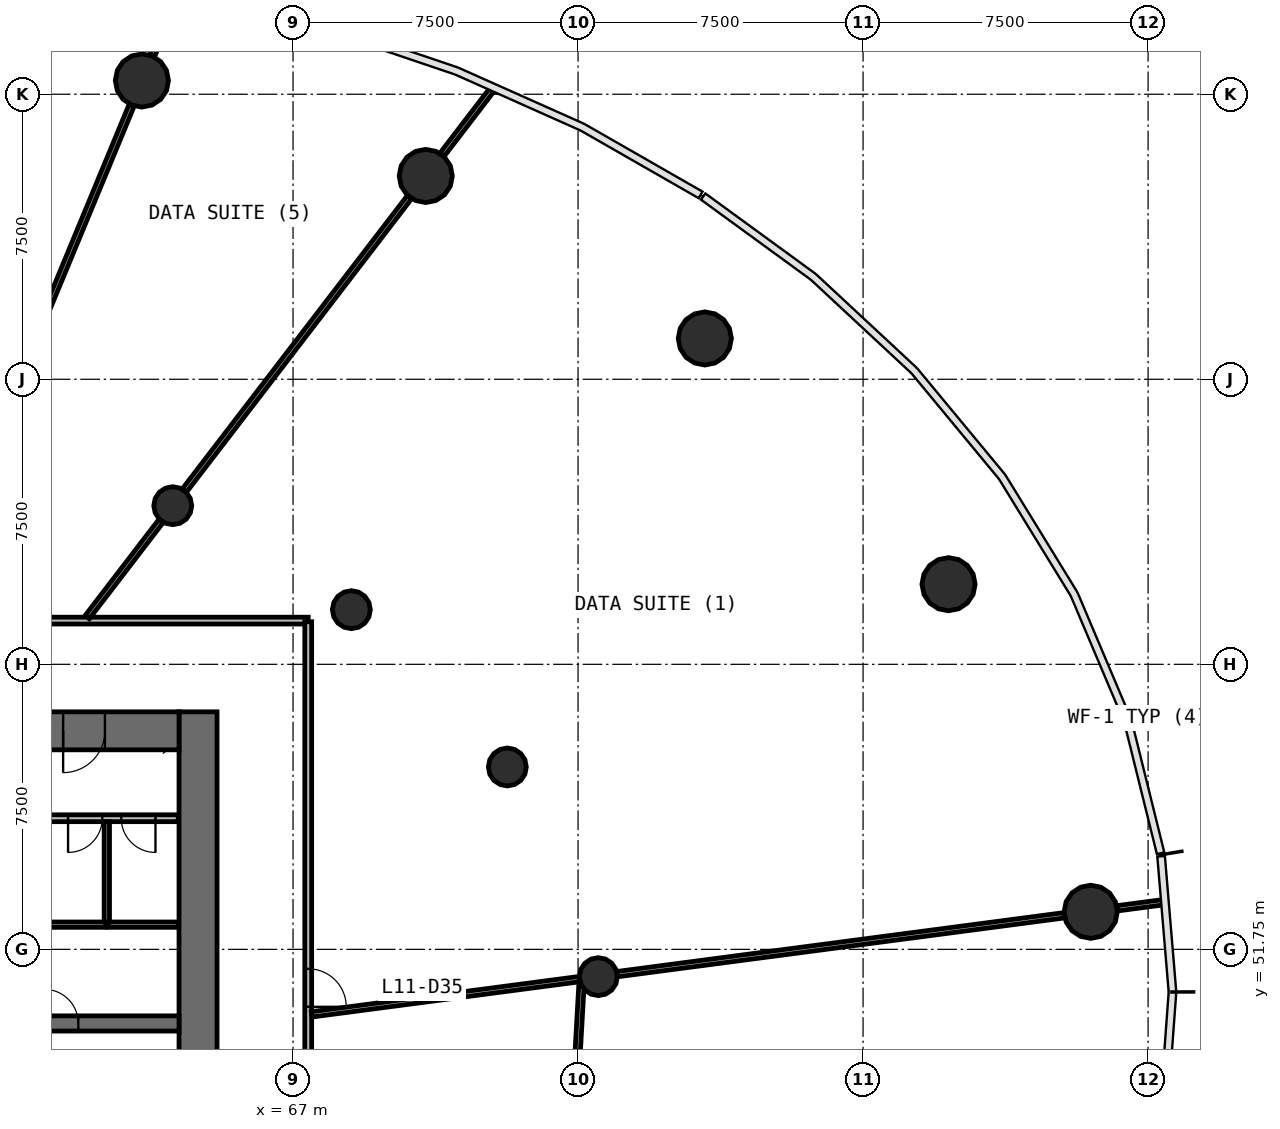
"""IFC4 building model, lengths in metres.
Left out: names, types, materials, properties, quantities, classifications, styles, units other than length and angle.
Written with IfcOpenShell. Run it as: python <this file> out.ifc"""

import sys

from ifc_helpers import new_model, si_unit, direction, frame, frame_2d, origin, origin_2d, place, context, subcontext, project, spatial, rectangle, circle, extrude, source, transform, mapped, element, fill, save


model = new_model("IFC4")
c1 = context("Model", 3, precision=1e-05, world=origin(), true_north=direction((0.0, 1.0)))
c2 = subcontext(c1, "Body", "Model", "MODEL_VIEW")
j1 = project(units=[si_unit("LENGTHUNIT", "METRE"), si_unit("PLANEANGLEUNIT", "RADIAN")], contexts=[c1])
p1 = place(None, origin())
s1 = spatial("IfcSite", under=j1, at=p1, CompositionType="ELEMENT")
p2 = place(p1, origin())
s2 = spatial("IfcBuilding", under=s1, at=p2, CompositionType="ELEMENT")
p3 = place(p2, frame((0.0, 0.0, 49.0)))
s3 = spatial("IfcBuildingStorey", under=s2, at=p3, CompositionType="ELEMENT", Elevation=49.0)
p4 = place(p3, frame((64.5, 38.0, 0.0), z_axis=(0.0, 0.0, 1.0), x_axis=(0.0, 1.0, 0.0)))
e1 = element("IfcWall", 1, at=p4, inside=s3, PredefinedType="SHEAR", context=c2, shape_type="SweptSolid", body=[
    extrude(rectangle(XDim=20.0, YDim=1.0, at=frame_2d((10.0, 0.0))), origin(), (0.0, 0.0, 1.0), 4.4),
])
p5 = place(p4, frame((9.1, 0.0, 0.0)))
e2 = element("IfcOpeningElement", 2, at=p5, cuts=e1, PredefinedType="OPENING", context=c2, shape_type="SweptSolid", body=[
    extrude(rectangle(XDim=1.8, YDim=2.1, at=frame_2d((0.9, 1.05))), frame((0.0, 0.51, 0.0), z_axis=(0.0, -1.0, 0.0), x_axis=(1.0, 0.0, 0.0)), (0.0, 0.0, 1.0), 1.02),
])
p6 = place(p3, frame((64.0, 57.5, 0.0), z_axis=(0.0, 0.0, 1.0), x_axis=(-1.0, 0.0, 0.0)))
e3 = element("IfcWall", 3, at=p6, inside=s3, PredefinedType="SHEAR", context=c2, shape_type="SweptSolid", body=[
    extrude(rectangle(XDim=24.0, YDim=1.0, at=frame_2d((12.0, 0.0))), origin(), (0.0, 0.0, 1.0), 4.4),
])
p7 = place(p6, frame((21.45, 0.0, 0.0)))
e4 = element("IfcOpeningElement", 4, at=p7, cuts=e3, PredefinedType="OPENING", context=c2, shape_type="SweptSolid", body=[
    extrude(rectangle(XDim=1.1, YDim=2.1, at=frame_2d((0.55, 1.05))), frame((0.0, 0.51, 0.0), z_axis=(0.0, -1.0, 0.0), x_axis=(1.0, 0.0, 0.0)), (0.0, 0.0, 1.0), 1.02),
])
p8 = place(p6, frame((1.95, 0.0, 0.0)))
e5 = element("IfcOpeningElement", 5, at=p8, cuts=e3, PredefinedType="OPENING", context=c2, shape_type="SweptSolid", body=[
    extrude(rectangle(XDim=1.1, YDim=2.1, at=frame_2d((0.55, 1.05))), frame((0.0, 0.51, 0.0), z_axis=(0.0, -1.0, 0.0), x_axis=(1.0, 0.0, 0.0)), (0.0, 0.0, 1.0), 1.02),
])
p9 = place(p3, frame((40.0, 49.8, 0.0), z_axis=(0.0, 0.0, 1.0), x_axis=(1.0, 0.0, 0.0)))
e6 = element("IfcWall", 6, at=p9, inside=s3, PredefinedType="SHEAR", context=c2, shape_type="SweptSolid", body=[
    extrude(rectangle(XDim=24.0, YDim=0.4, at=frame_2d((12.0, 0.0))), origin(), (0.0, 0.0, 1.0), 4.4),
])
p10 = place(p9, frame((4.5, 0.0, 0.0)))
e7 = element("IfcOpeningElement", 7, at=p10, cuts=e6, PredefinedType="OPENING", context=c2, shape_type="SweptSolid", body=[
    extrude(rectangle(XDim=1.1, YDim=2.1, at=frame_2d((0.55, 1.05))), frame((0.0, 0.21, 0.0), z_axis=(0.0, -1.0, 0.0), x_axis=(1.0, 0.0, 0.0)), (0.0, 0.0, 1.0), 0.42),
])
p11 = place(p9, frame((7.0, 0.0, 0.0)))
e8 = element("IfcOpeningElement", 8, at=p11, cuts=e6, PredefinedType="OPENING", context=c2, shape_type="SweptSolid", body=[
    extrude(rectangle(XDim=1.1, YDim=2.1, at=frame_2d((0.55, 1.05))), frame((0.0, 0.21, 0.0), z_axis=(0.0, -1.0, 0.0), x_axis=(1.0, 0.0, 0.0)), (0.0, 0.0, 1.0), 0.42),
])
p12 = place(p9, frame((9.5, 0.0, 0.0)))
e9 = element("IfcOpeningElement", 9, at=p12, cuts=e6, PredefinedType="OPENING", context=c2, shape_type="SweptSolid", body=[
    extrude(rectangle(XDim=1.1, YDim=2.1, at=frame_2d((0.55, 1.05))), frame((0.0, 0.21, 0.0), z_axis=(0.0, -1.0, 0.0), x_axis=(1.0, 0.0, 0.0)), (0.0, 0.0, 1.0), 0.42),
])
p13 = place(p9, frame((0.9, 0.0, 0.0)))
e10 = element("IfcOpeningElement", 10, at=p13, cuts=e6, PredefinedType="OPENING", context=c2, shape_type="SweptSolid", body=[
    extrude(rectangle(XDim=1.8, YDim=2.4, at=frame_2d((0.9, 1.2))), frame((0.0, 0.21, 0.0), z_axis=(0.0, -1.0, 0.0), x_axis=(1.0, 0.0, 0.0)), (0.0, 0.0, 1.0), 0.42),
])
p14 = place(p9, frame((20.45, 0.0, 0.0)))
e11 = element("IfcOpeningElement", 11, at=p14, cuts=e6, PredefinedType="OPENING", context=c2, shape_type="SweptSolid", body=[
    extrude(rectangle(XDim=0.9, YDim=2.1, at=frame_2d((0.45, 1.05))), frame((0.0, 0.21, 0.0), z_axis=(0.0, -1.0, 0.0), x_axis=(1.0, 0.0, 0.0)), (0.0, 0.0, 1.0), 0.42),
])
p15 = place(p9, frame((11.65, 0.0, 0.0)))
e12 = element("IfcOpeningElement", 12, at=p15, cuts=e6, PredefinedType="OPENING", context=c2, shape_type="SweptSolid", body=[
    extrude(rectangle(XDim=0.9, YDim=2.1, at=frame_2d((0.45, 1.05))), frame((0.0, 0.21, 0.0), z_axis=(0.0, -1.0, 0.0), x_axis=(1.0, 0.0, 0.0)), (0.0, 0.0, 1.0), 0.42),
])
m1 = source(origin(), c2, "Body", "SweptSolid", [
    extrude(circle(Radius=0.7, at=origin_2d()), origin(), (0.0, 0.0, 1.0), 4.4),
])
for number, where, z_axis, x_axis in (
    (13, (87.99, 52.738, 0.0), (0.0, 0.0, 1.0), (1.0, 0.0, 0.0)),
    (14, (84.249, 61.358, 0.0), (0.0, 0.0, 1.0), (1.0, 0.0, 0.0)),
    (15, (77.836, 67.824, 0.0), (0.0, 0.0, 1.0), (1.0, 0.0, 0.0)),
    (16, (70.492, 72.1, 0.0), (0.0, 0.0, 1.0), (1.0, 0.0, 0.0)),
    (17, (63.023, 74.611, 0.0), (0.0, 0.0, 1.0), (1.0, 0.0, 0.0)),
):
    element("IfcColumn", number, at=place(p3, frame(where, z_axis=z_axis, x_axis=x_axis)), inside=s3, PredefinedType="COLUMN", context=c2, shape_type="MappedRepresentation", body=[
        mapped(m1, transform((0.0, 0.0, 0.0), scale=1.0)),
    ])
m2 = source(origin(), c2, "Body", "SweptSolid", [
    extrude(circle(Radius=0.5, at=origin_2d()), origin(), (0.0, 0.0, 1.0), 4.4),
])
for number, where, z_axis, x_axis in (
    (18, (75.034, 51.032, 0.0), (0.0, 0.0, 1.0), (1.0, 0.0, 0.0)),
    (19, (72.639, 56.549, 0.0), (0.0, 0.0, 1.0), (1.0, 0.0, 0.0)),
    (20, (68.535, 60.688, 0.0), (0.0, 0.0, 1.0), (1.0, 0.0, 0.0)),
    (21, (63.835, 63.424, 0.0), (0.0, 0.0, 1.0), (1.0, 0.0, 0.0)),
):
    element("IfcColumn", number, at=place(p3, frame(where, z_axis=z_axis, x_axis=x_axis)), inside=s3, PredefinedType="COLUMN", context=c2, shape_type="MappedRepresentation", body=[
        mapped(m2, transform((0.0, 0.0, 0.0), scale=1.0)),
    ])
p16 = place(p3, frame((36.6, 60.4, 0.0), z_axis=(0.0, 0.0, 1.0), x_axis=(1.0, 0.0, 0.0)))
e22 = element("IfcWall", 22, at=p16, inside=s3, PredefinedType="PARTITIONING", context=c2, shape_type="SweptSolid", body=[
    extrude(rectangle(XDim=30.8, YDim=0.18, at=frame_2d((15.4, 0.0))), origin(), (0.0, 0.0, 1.0), 3.05),
])
p17 = place(p16, frame((20.95, 0.0, 0.0)))
e23 = element("IfcOpeningElement", 23, at=p17, cuts=e22, PredefinedType="OPENING", context=c2, shape_type="SweptSolid", body=[
    extrude(rectangle(XDim=1.0, YDim=2.1, at=frame_2d((0.5, 1.05))), frame((0.0, 0.1, 0.0), z_axis=(0.0, -1.0, 0.0), x_axis=(1.0, 0.0, 0.0)), (0.0, 0.0, 1.0), 0.2),
])
p18 = place(p16, frame((17.35, 0.0, 0.0)))
e24 = element("IfcOpeningElement", 24, at=p18, cuts=e22, PredefinedType="OPENING", context=c2, shape_type="SweptSolid", body=[
    extrude(rectangle(XDim=1.0, YDim=2.1, at=frame_2d((0.5, 1.05))), frame((0.0, 0.1, 0.0), z_axis=(0.0, -1.0, 0.0), x_axis=(1.0, 0.0, 0.0)), (0.0, 0.0, 1.0), 0.2),
])
p19 = place(p16, frame((14.95, 0.0, 0.0)))
e25 = element("IfcOpeningElement", 25, at=p19, cuts=e22, PredefinedType="OPENING", context=c2, shape_type="SweptSolid", body=[
    extrude(rectangle(XDim=1.0, YDim=2.1, at=frame_2d((0.5, 1.05))), frame((0.0, 0.1, 0.0), z_axis=(0.0, -1.0, 0.0), x_axis=(1.0, 0.0, 0.0)), (0.0, 0.0, 1.0), 0.2),
])
p20 = place(p3, frame((67.4, 60.37, 0.0), z_axis=(0.0, 0.0, 1.0), x_axis=(0.0, -1.0, 0.0)))
e26 = element("IfcWall", 26, at=p20, inside=s3, PredefinedType="PARTITIONING", context=c2, shape_type="SweptSolid", body=[
    extrude(rectangle(XDim=23.583, YDim=0.18, at=frame_2d((11.791, 0.0))), origin(), (0.0, 0.0, 1.0), 3.05),
])
p21 = place(p20, frame((11.333, 0.0, 0.0)))
e27 = element("IfcOpeningElement", 27, at=p21, cuts=e26, PredefinedType="OPENING", context=c2, shape_type="SweptSolid", body=[
    extrude(rectangle(XDim=1.0, YDim=2.1, at=frame_2d((0.5, 1.05))), frame((0.0, 0.1, 0.0), z_axis=(0.0, -1.0, 0.0), x_axis=(1.0, 0.0, 0.0)), (0.0, 0.0, 1.0), 0.2),
])
p22 = place(p20, frame((9.133, 0.0, 0.0)))
e28 = element("IfcOpeningElement", 28, at=p22, cuts=e26, PredefinedType="OPENING", context=c2, shape_type="SweptSolid", body=[
    extrude(rectangle(XDim=1.0, YDim=2.1, at=frame_2d((0.5, 1.05))), frame((0.0, 0.1, 0.0), z_axis=(0.0, -1.0, 0.0), x_axis=(1.0, 0.0, 0.0)), (0.0, 0.0, 1.0), 0.2),
])
p23 = place(p3, frame((63.98, 55.2, 0.0), z_axis=(0.0, 0.0, 1.0), x_axis=(-1.0, 0.0, 0.0)))
e29 = element("IfcWall", 29, at=p23, inside=s3, PredefinedType="PARTITIONING", context=c2, shape_type="SweptSolid", body=[
    extrude(rectangle(XDim=3.75, YDim=0.18, at=frame_2d((1.875, 0.0))), origin(), (0.0, 0.0, 1.0), 3.95),
])
p24 = place(p23, frame((2.0, 0.0, 0.0)))
e30 = element("IfcOpeningElement", 30, at=p24, cuts=e29, PredefinedType="OPENING", context=c2, shape_type="SweptSolid", body=[
    extrude(rectangle(XDim=0.9, YDim=2.1, at=frame_2d((0.45, 1.05))), frame((0.0, 0.1, 0.0), z_axis=(0.0, -1.0, 0.0), x_axis=(1.0, 0.0, 0.0)), (0.0, 0.0, 1.0), 0.2),
])
p25 = place(p23, frame((0.6, 0.0, 0.0)))
e31 = element("IfcOpeningElement", 31, at=p25, cuts=e29, PredefinedType="OPENING", context=c2, shape_type="SweptSolid", body=[
    extrude(rectangle(XDim=0.9, YDim=2.1, at=frame_2d((0.45, 1.05))), frame((0.0, 0.1, 0.0), z_axis=(0.0, -1.0, 0.0), x_axis=(1.0, 0.0, 0.0)), (0.0, 0.0, 1.0), 0.2),
])
p26 = place(p3, frame((75.534, 51.098, 0.0), z_axis=(0.0, 0.0, 1.0), x_axis=(0.991446586451, 0.130513088287, 0.0)))
e32 = element("IfcWall", 32, at=p26, inside=s3, PredefinedType="PARTITIONING", context=c2, shape_type="SweptSolid", body=[
    extrude(rectangle(XDim=11.86, YDim=0.14, at=frame_2d((5.93, 0.0))), origin(), (0.0, 0.0, 1.0), 3.05),
])
p27 = place(p3, frame((64.142, 63.824, 0.0), z_axis=(0.0, 0.0, 1.0), x_axis=(0.608770295053, 0.793346537057, 0.0)))
e33 = element("IfcWall", 33, at=p27, inside=s3, PredefinedType="PARTITIONING", context=c2, shape_type="SweptSolid", body=[
    extrude(rectangle(XDim=9.727, YDim=0.14, at=frame_2d((4.864, 0.0))), origin(), (0.0, 0.0, 1.0), 3.05),
])
p28 = place(p3, frame((59.248, 65.498, 0.0), z_axis=(0.0, 0.0, 1.0), x_axis=(0.382672728165, 0.923883966264, 0.0)))
e34 = element("IfcWall", 34, at=p28, inside=s3, PredefinedType="PARTITIONING", context=c2, shape_type="SweptSolid", body=[
    extrude(rectangle(XDim=9.16, YDim=0.14, at=frame_2d((4.58, 0.0))), origin(), (0.0, 0.0, 1.0), 3.05),
])
p29 = place(p3, frame((67.49, 50.039, 0.0), z_axis=(0.0, 0.0, 1.0), x_axis=(0.99144622305, 0.130515848849, 0.0)))
e35 = element("IfcWall", 35, at=p29, inside=s3, PredefinedType="PARTITIONING", context=c2, shape_type="SweptSolid", body=[
    extrude(rectangle(XDim=7.104, YDim=0.14, at=frame_2d((3.552, 0.0))), origin(), (0.0, 0.0, 1.0), 3.05),
])
p30 = place(p3, frame((74.589, 50.793, 0.0), z_axis=(0.0, 0.0, 1.0), x_axis=(-0.056551571082, -0.998399679391, 0.0)))
e36 = element("IfcWall", 36, at=p30, inside=s3, PredefinedType="PARTITIONING", context=c2, shape_type="SweptSolid", body=[
    extrude(rectangle(XDim=5.401, YDim=0.14, at=frame_2d((2.7, 0.0))), origin(), (0.0, 0.0, 1.0), 3.05),
])
p31 = place(p30, frame((2.151, 0.0, 0.0)))
e37 = element("IfcOpeningElement", 37, at=p31, cuts=e36, PredefinedType="OPENING", context=c2, shape_type="SweptSolid", body=[
    extrude(rectangle(XDim=1.0, YDim=2.1, at=frame_2d((0.5, 1.05))), frame((0.0, 0.08, 0.0), z_axis=(0.0, -1.0, 0.0), x_axis=(1.0, 0.0, 0.0)), (0.0, 0.0, 1.0), 0.16),
])
p32 = place(p3, frame((61.584, 60.49, 0.0), z_axis=(0.0, 0.0, 1.0), x_axis=(0.60874605662, 0.793365135703, 0.0)))
e38 = element("IfcWall", 38, at=p32, inside=s3, PredefinedType="PARTITIONING", context=c2, shape_type="SweptSolid", body=[
    extrude(rectangle(XDim=3.194, YDim=0.14, at=frame_2d((1.597, 0.0))), origin(), (0.0, 0.0, 1.0), 3.05),
])
p33 = place(p3, frame((62.1, 52.4, 0.0), z_axis=(0.0, 0.0, 1.0), x_axis=(0.0, 1.0, 0.0)))
e39 = element("IfcWall", 39, at=p33, inside=s3, PredefinedType="PARTITIONING", context=c2, shape_type="SweptSolid", body=[
    extrude(rectangle(XDim=2.71, YDim=0.14, at=frame_2d((1.355, 0.0))), origin(), (0.0, 0.0, 1.0), 3.05),
])
p34 = place(p3, frame((70.921, 72.658, 0.0), z_axis=(0.0, 0.0, 1.0), x_axis=(0.608822106268, 0.793306777306, 0.0)))
e40 = element("IfcWall", 40, at=p34, inside=s3, PredefinedType="PARTITIONING", context=c2, shape_type="SweptSolid", body=[
    extrude(rectangle(XDim=2.152, YDim=0.14, at=frame_2d((1.076, 0.0))), origin(), (0.0, 0.0, 1.0), 3.05),
])
p35 = place(p3, frame((62.07, 52.4, 0.0), z_axis=(0.0, 0.0, 1.0), x_axis=(-1.0, 0.0, 0.0)))
e41 = element("IfcWall", 41, at=p35, inside=s3, PredefinedType="PARTITIONING", context=c2, shape_type="SweptSolid", body=[
    extrude(rectangle(XDim=1.84, YDim=0.14, at=frame_2d((0.92, 0.0))), origin(), (0.0, 0.0, 1.0), 3.05),
])
p36 = place(p3, frame((63.98, 52.4, 0.0), z_axis=(0.0, 0.0, 1.0), x_axis=(-1.0, 0.0, 0.0)))
e42 = element("IfcWall", 42, at=p36, inside=s3, PredefinedType="PARTITIONING", context=c2, shape_type="SweptSolid", body=[
    extrude(rectangle(XDim=1.85, YDim=0.14, at=frame_2d((0.925, 0.0))), origin(), (0.0, 0.0, 1.0), 3.05),
])
p37 = place(p3, frame((63.292, 75.263, 0.0), z_axis=(0.0, 0.0, 1.0), x_axis=(0.382632674553, 0.923900555452, 0.0)))
e43 = element("IfcWall", 43, at=p37, inside=s3, PredefinedType="PARTITIONING", context=c2, shape_type="SweptSolid", body=[
    extrude(rectangle(XDim=1.714, YDim=0.14, at=frame_2d((0.857, 0.0))), origin(), (0.0, 0.0, 1.0), 3.05),
])
p38 = place(p3, frame((88.689, 52.83, 0.0), z_axis=(0.0, 0.0, 1.0), x_axis=(0.991424298155, 0.130682290411, 0.0)))
e44 = element("IfcWall", 44, at=p38, inside=s3, PredefinedType="PARTITIONING", context=c2, shape_type="SweptSolid", body=[
    extrude(rectangle(XDim=1.22, YDim=0.14, at=frame_2d((0.61, 0.0))), origin(), (0.0, 0.0, 1.0), 3.05),
])
m3 = source(origin(), c2, "Body", "SweptSolid", [
    extrude(rectangle(XDim=1.1, YDim=2.1, at=frame_2d((0.55, 1.05))), frame((0.0, 0.025, 0.0), z_axis=(0.0, -1.0, 0.0), x_axis=(1.0, 0.0, 0.0)), (0.0, 0.0, 1.0), 0.05),
])
p39 = place(p8, origin())
e45 = element("IfcDoor", 45, at=p39, inside=s3, OperationType="SINGLE_SWING_RIGHT", PredefinedType="DOOR", context=c2, shape_type="MappedRepresentation", body=[
    mapped(m3, transform((0.0, 0.0, 0.0), scale=1.0)),
])
fill(e5, e45)
m4 = source(origin(), c2, "Body", "SweptSolid", [
    extrude(rectangle(XDim=1.0, YDim=2.1, at=frame_2d((0.5, 1.05))), frame((0.0, 0.025, 0.0), z_axis=(0.0, -1.0, 0.0), x_axis=(1.0, 0.0, 0.0)), (0.0, 0.0, 1.0), 0.05),
])
p40 = place(p22, origin())
e46 = element("IfcDoor", 46, at=p40, inside=s3, OperationType="SINGLE_SWING_RIGHT", PredefinedType="DOOR", context=c2, shape_type="MappedRepresentation", body=[
    mapped(m4, transform((0.0, 0.0, 0.0), scale=1.0)),
])
fill(e28, e46)
m5 = source(origin(), c2, "Body", "SweptSolid", [
    extrude(rectangle(XDim=0.9, YDim=2.1, at=frame_2d((0.45, 1.05))), frame((0.0, 0.025, 0.0), z_axis=(0.0, -1.0, 0.0), x_axis=(1.0, 0.0, 0.0)), (0.0, 0.0, 1.0), 0.05),
])
p41 = place(p14, origin())
e47 = element("IfcDoor", 47, at=p41, inside=s3, OperationType="SINGLE_SWING_LEFT", PredefinedType="DOOR", context=c2, shape_type="MappedRepresentation", body=[
    mapped(m5, transform((0.0, 0.0, 0.0), scale=1.0)),
])
fill(e11, e47)
p42 = place(p24, origin())
e48 = element("IfcDoor", 48, at=p42, inside=s3, OperationType="SINGLE_SWING_RIGHT", PredefinedType="DOOR", context=c2, shape_type="MappedRepresentation", body=[
    mapped(m5, transform((0.0, 0.0, 0.0), scale=1.0)),
])
fill(e30, e48)
p43 = place(p25, origin())
e49 = element("IfcDoor", 49, at=p43, inside=s3, OperationType="SINGLE_SWING_LEFT", PredefinedType="DOOR", context=c2, shape_type="MappedRepresentation", body=[
    mapped(m5, transform((0.0, 0.0, 0.0), scale=1.0)),
])
fill(e31, e49)
save(model, sys.argv[1])
